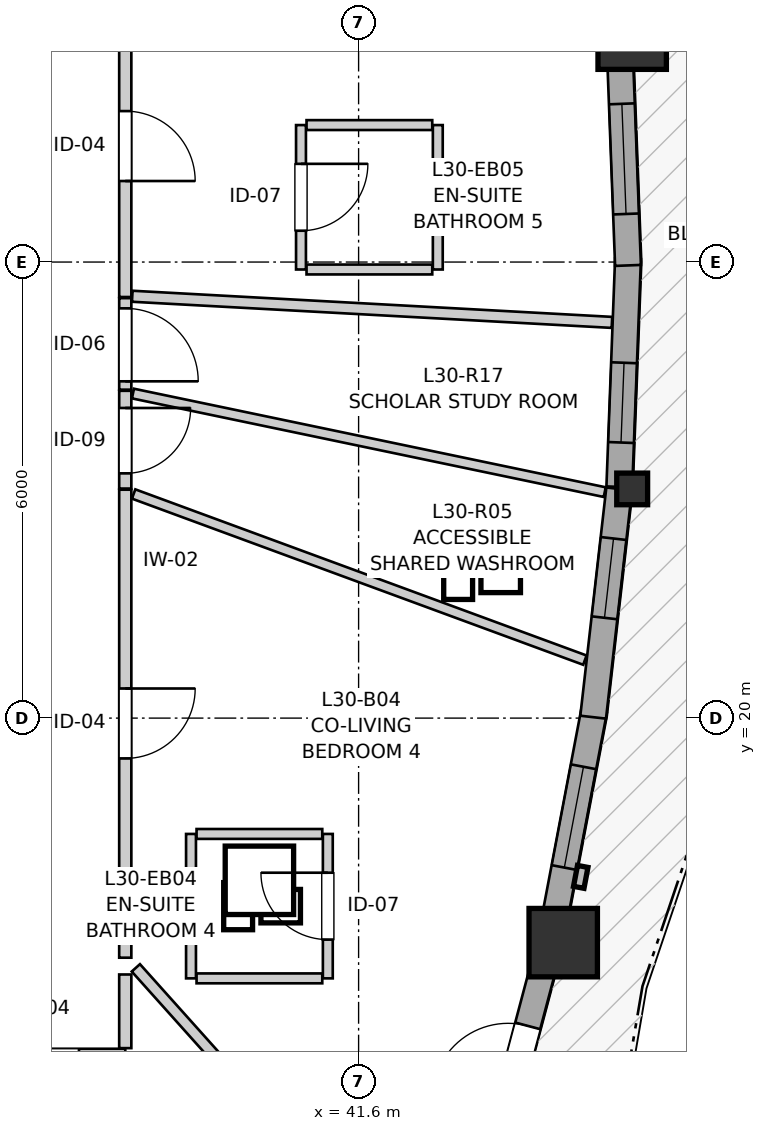
"""IFC4 building model, lengths in metres.
Left out: names, types, materials, properties, quantities, classifications, styles, units other than length and angle.
Written with IfcOpenShell. Run it as: python <this file> out.ifc"""

import sys

from ifc_helpers import new_model, si_unit, direction, frame, frame_2d, origin, origin_2d, place, context, subcontext, project, spatial, rectangle, i_section, extrude, source, transform, mapped, element, fill, save


model = new_model("IFC4")
c1 = context("Model", 3, precision=1e-05, world=origin(), true_north=direction((0.0, 1.0)))
c2 = subcontext(c1, "Body", "Model", "MODEL_VIEW")
j1 = project(units=[si_unit("LENGTHUNIT", "METRE"), si_unit("PLANEANGLEUNIT", "RADIAN")], contexts=[c1])
p1 = place(None, origin())
s1 = spatial("IfcSite", under=j1, at=p1, CompositionType="ELEMENT")
p2 = place(p1, origin())
s2 = spatial("IfcBuilding", under=s1, at=p2, CompositionType="ELEMENT")
p3 = place(p2, frame((0.0, 0.0, 102.4)))
s3 = spatial("IfcBuildingStorey", under=s2, at=p3, CompositionType="ELEMENT", Elevation=102.4)
m1 = source(origin(), c2, "Body", "SweptSolid", [
    extrude(rectangle(XDim=0.9, YDim=0.9, at=origin_2d()), origin(), (0.0, 0.0, 1.0), 2.95),
])
p4 = place(p3, frame((44.292, 17.046, 0.0), z_axis=(0.0, 0.0, 1.0), x_axis=(1.0, 0.0, 0.0)))
e1 = element("IfcColumn", 1, at=p4, inside=s3, PredefinedType="COLUMN", context=c2, shape_type="MappedRepresentation", body=[
    mapped(m1, transform((0.0, 0.0, 0.0), x_axis=(1.0, 0.0, 0.0), y_axis=(0.0, 1.0, 0.0), z_axis=(0.0, 0.0, 1.0), scale=1.0)),
])
m2 = source(origin(), c2, "Body", "SweptSolid", [
    extrude(i_section(OverallWidth=0.406, OverallDepth=0.416, WebThickness=0.027, FlangeThickness=0.044, FilletRadius=0.015, at=origin_2d()), origin(), (0.0, 0.0, 1.0), 2.95),
])
p5 = place(p3, frame((45.199, 23.015, 0.0), z_axis=(0.0, 0.0, 1.0), x_axis=(1.0, 0.0, 0.0)))
e2 = element("IfcColumn", 2, at=p5, inside=s3, PredefinedType="PILASTER", context=c2, shape_type="MappedRepresentation", body=[
    mapped(m2, transform((0.0, 0.0, 0.0), x_axis=(1.0, 0.0, 0.0), y_axis=(0.0, 1.0, 0.0), z_axis=(0.0, 0.0, 1.0), scale=1.0)),
])
p6 = place(p3, frame((45.199, 28.985, 0.0), z_axis=(0.0, 0.0, 1.0), x_axis=(1.0, 0.0, 0.0)))
e3 = element("IfcColumn", 3, at=p6, inside=s3, PredefinedType="COLUMN", context=c2, shape_type="MappedRepresentation", body=[
    mapped(m1, transform((0.0, 0.0, 0.0), x_axis=(1.0, 0.0, 0.0), y_axis=(0.0, 1.0, 0.0), z_axis=(0.0, 0.0, 1.0), scale=1.0)),
])
p7 = place(p3, frame((43.324, 14.068, 0.0), z_axis=(0.0, 0.0, 1.0), x_axis=(0.257085513118, 0.966388658328, 0.0)))
e4 = element("IfcWall", 4, at=p7, inside=s3, PredefinedType="SOLIDWALL", context=c2, shape_type="SweptSolid", body=[
    extrude(rectangle(XDim=2.896, YDim=0.34, at=frame_2d((1.448, 0.0))), origin(), (0.0, 0.0, 1.0), 2.48),
])
p8 = place(p7, frame((0.948, 0.0, 0.0)))
e5 = element("IfcOpeningElement", 5, at=p8, cuts=e4, PredefinedType="OPENING", context=c2, shape_type="SweptSolid", body=[
    extrude(rectangle(XDim=1.0, YDim=2.1, at=frame_2d((0.5, 1.05))), frame((0.0, 0.18, 0.0), z_axis=(0.0, -1.0, 0.0), x_axis=(1.0, 0.0, 0.0)), (0.0, 0.0, 1.0), 0.36),
])
p9 = place(p3, frame((44.168, 17.304, 0.0), z_axis=(0.0, 0.0, 1.0), x_axis=(0.186654850509, 0.982425552793, 0.0)))
e6 = element("IfcWall", 6, at=p9, inside=s3, PredefinedType="SOLIDWALL", context=c2, shape_type="SweptSolid", body=[
    extrude(rectangle(XDim=2.846, YDim=0.34, at=frame_2d((1.423, 0.0))), origin(), (0.0, 0.0, 1.0), 2.48),
])
p10 = place(p9, frame((0.743, 0.0, 0.82)))
e7 = element("IfcOpeningElement", 7, at=p10, cuts=e6, PredefinedType="OPENING", context=c2, shape_type="SweptSolid", body=[
    extrude(rectangle(XDim=1.35, YDim=1.45, at=frame_2d((0.675, 0.725))), frame((0.0, 0.18, 0.0), z_axis=(0.0, -1.0, 0.0), x_axis=(1.0, 0.0, 0.0)), (0.0, 0.0, 1.0), 0.36),
])
p11 = place(p3, frame((44.686, 20.012, 0.0), z_axis=(0.0, 0.0, 1.0), x_axis=(0.113268604106, 0.993564403209, 0.0)))
e8 = element("IfcWall", 8, at=p11, inside=s3, PredefinedType="SOLIDWALL", context=c2, shape_type="SweptSolid", body=[
    extrude(rectangle(XDim=3.022, YDim=0.34, at=frame_2d((1.511, 0.0))), origin(), (0.0, 0.0, 1.0), 2.48),
])
p12 = place(p11, frame((1.316, 0.0, 0.82)))
e9 = element("IfcOpeningElement", 9, at=p12, cuts=e8, PredefinedType="OPENING", context=c2, shape_type="SweptSolid", body=[
    extrude(rectangle(XDim=1.05, YDim=1.45, at=frame_2d((0.525, 0.725))), frame((0.0, 0.18, 0.0), z_axis=(0.0, -1.0, 0.0), x_axis=(1.0, 0.0, 0.0)), (0.0, 0.0, 1.0), 0.36),
])
p13 = place(p3, frame((45.031, 23.042, 0.0), z_axis=(0.0, 0.0, 1.0), x_axis=(0.037943223979, 0.999279896603, 0.0)))
e10 = element("IfcWall", 10, at=p13, inside=s3, PredefinedType="SOLIDWALL", context=c2, shape_type="SweptSolid", body=[
    extrude(rectangle(XDim=3.005, YDim=0.34, at=frame_2d((1.502, 0.0))), origin(), (0.0, 0.0, 1.0), 2.48),
])
p14 = place(p13, frame((0.584, 0.0, 0.82)))
e11 = element("IfcOpeningElement", 11, at=p14, cuts=e10, PredefinedType="OPENING", context=c2, shape_type="SweptSolid", body=[
    extrude(rectangle(XDim=1.05, YDim=1.45, at=frame_2d((0.525, 0.725))), frame((0.0, 0.18, 0.0), z_axis=(0.0, -1.0, 0.0), x_axis=(1.0, 0.0, 0.0)), (0.0, 0.0, 1.0), 0.36),
])
p15 = place(p3, frame((45.145, 25.956, 0.0), z_axis=(0.0, 0.0, 1.0), x_axis=(-0.038000333161, 0.9992777265, 0.0)))
e12 = element("IfcWall", 12, at=p15, inside=s3, PredefinedType="SOLIDWALL", context=c2, shape_type="SweptSolid", body=[
    extrude(rectangle(XDim=2.795, YDim=0.34, at=frame_2d((1.397, 0.0))), origin(), (0.0, 0.0, 1.0), 2.48),
])
p16 = place(p15, frame((0.677, 0.0, 0.82)))
e13 = element("IfcOpeningElement", 13, at=p16, cuts=e12, PredefinedType="OPENING", context=c2, shape_type="SweptSolid", body=[
    extrude(rectangle(XDim=1.45, YDim=1.25, at=frame_2d((0.725, 0.625))), frame((0.0, 0.18, 0.0), z_axis=(0.0, -1.0, 0.0), x_axis=(1.0, 0.0, 0.0)), (0.0, 0.0, 1.0), 0.36),
])
p17 = place(p3, frame((38.53, 23.005, 0.0), z_axis=(0.0, 0.0, 1.0), x_axis=(0.0, -1.0, 0.0)))
e14 = element("IfcWall", 14, at=p17, inside=s3, PredefinedType="PARTITIONING", context=c2, shape_type="SweptSolid", body=[
    extrude(rectangle(XDim=6.157, YDim=0.16, at=frame_2d((3.079, 0.0))), origin(), (0.0, 0.0, 1.0), 2.95),
])
p18 = place(p17, frame((2.615, 0.0, 0.0)))
e15 = element("IfcOpeningElement", 15, at=p18, cuts=e14, PredefinedType="OPENING", context=c2, shape_type="SweptSolid", body=[
    extrude(rectangle(XDim=0.92, YDim=2.1, at=frame_2d((0.46, 1.05))), frame((0.0, 0.09, 0.0), z_axis=(0.0, -1.0, 0.0), x_axis=(1.0, 0.0, 0.0)), (0.0, 0.0, 1.0), 0.18),
])
p19 = place(p3, frame((38.53, 29.514, 0.0), z_axis=(0.0, 0.0, 1.0), x_axis=(0.0, -1.0, 0.0)))
e16 = element("IfcWall", 16, at=p19, inside=s3, PredefinedType="PARTITIONING", context=c2, shape_type="SweptSolid", body=[
    extrude(rectangle(XDim=3.974, YDim=0.16, at=frame_2d((1.987, 0.0))), origin(), (0.0, 0.0, 1.0), 2.95),
])
p20 = place(p19, frame((1.528, 0.0, 0.0)))
e17 = element("IfcOpeningElement", 17, at=p20, cuts=e16, PredefinedType="OPENING", context=c2, shape_type="SweptSolid", body=[
    extrude(rectangle(XDim=0.92, YDim=2.1, at=frame_2d((0.46, 1.05))), frame((0.0, 0.09, 0.0), z_axis=(0.0, -1.0, 0.0), x_axis=(1.0, 0.0, 0.0)), (0.0, 0.0, 1.0), 0.18),
])
p21 = place(p3, frame((38.53, 15.57, 0.0), z_axis=(0.0, 0.0, 1.0), x_axis=(-1.0, 0.0, 0.0)))
e18 = element("IfcWall", 18, at=p21, inside=s3, PredefinedType="PARTITIONING", context=c2, shape_type="SweptSolid", body=[
    extrude(rectangle(XDim=2.156, YDim=0.16, at=frame_2d((1.078, 0.0))), origin(), (0.0, 0.0, 1.0), 2.95),
])
p22 = place(p21, frame((0.609, 0.0, 0.0)))
e19 = element("IfcOpeningElement", 19, at=p22, cuts=e18, PredefinedType="OPENING", context=c2, shape_type="SweptSolid", body=[
    extrude(rectangle(XDim=0.92, YDim=2.1, at=frame_2d((0.46, 1.05))), frame((0.0, 0.09, 0.0), z_axis=(0.0, -1.0, 0.0), x_axis=(1.0, 0.0, 0.0)), (0.0, 0.0, 1.0), 0.18),
])
p23 = place(p3, frame((41.195, 16.576, 0.0), z_axis=(0.0, 0.0, 1.0), x_axis=(0.0, 1.0, 0.0)))
e20 = element("IfcWall", 20, at=p23, inside=s3, PredefinedType="PARTITIONING", context=c2, shape_type="SweptSolid", body=[
    extrude(rectangle(XDim=1.9, YDim=0.13, at=frame_2d((0.95, 0.0))), origin(), (0.0, 0.0, 1.0), 2.95),
])
p24 = place(p23, frame((0.51, 0.0, 0.0)))
e21 = element("IfcOpeningElement", 21, at=p24, cuts=e20, PredefinedType="OPENING", context=c2, shape_type="SweptSolid", body=[
    extrude(rectangle(XDim=0.88, YDim=2.05, at=frame_2d((0.44, 1.025))), frame((0.0, 0.075, 0.0), z_axis=(0.0, -1.0, 0.0), x_axis=(1.0, 0.0, 0.0)), (0.0, 0.0, 1.0), 0.15),
])
p25 = place(p3, frame((40.842, 27.802, 0.0), z_axis=(0.0, 0.0, 1.0), x_axis=(0.0, -1.0, 0.0)))
e22 = element("IfcWall", 22, at=p25, inside=s3, PredefinedType="PARTITIONING", context=c2, shape_type="SweptSolid", body=[
    extrude(rectangle(XDim=1.9, YDim=0.13, at=frame_2d((0.95, 0.0))), origin(), (0.0, 0.0, 1.0), 2.95),
])
p26 = place(p25, frame((0.51, 0.0, 0.0)))
e23 = element("IfcOpeningElement", 23, at=p26, cuts=e22, PredefinedType="OPENING", context=c2, shape_type="SweptSolid", body=[
    extrude(rectangle(XDim=0.88, YDim=2.05, at=frame_2d((0.44, 1.025))), frame((0.0, 0.075, 0.0), z_axis=(0.0, -1.0, 0.0), x_axis=(1.0, 0.0, 0.0)), (0.0, 0.0, 1.0), 0.15),
])
p27 = place(p3, frame((38.53, 24.306, 0.0), z_axis=(0.0, 0.0, 1.0), x_axis=(0.0, -1.0, 0.0)))
e24 = element("IfcWall", 24, at=p27, inside=s3, PredefinedType="PARTITIONING", context=c2, shape_type="SweptSolid", body=[
    extrude(rectangle(XDim=1.286, YDim=0.16, at=frame_2d((0.643, 0.0))), origin(), (0.0, 0.0, 1.0), 2.95),
])
p28 = place(p27, frame((0.226, 0.0, 0.0)))
e25 = element("IfcOpeningElement", 25, at=p28, cuts=e24, PredefinedType="OPENING", context=c2, shape_type="SweptSolid", body=[
    extrude(rectangle(XDim=0.86, YDim=2.05, at=frame_2d((0.43, 1.025))), frame((0.0, 0.09, 0.0), z_axis=(0.0, -1.0, 0.0), x_axis=(1.0, 0.0, 0.0)), (0.0, 0.0, 1.0), 0.18),
])
p29 = place(p3, frame((38.53, 25.525, 0.0), z_axis=(0.0, 0.0, 1.0), x_axis=(0.0, -1.0, 0.0)))
e26 = element("IfcWall", 26, at=p29, inside=s3, PredefinedType="PARTITIONING", context=c2, shape_type="SweptSolid", body=[
    extrude(rectangle(XDim=1.204, YDim=0.16, at=frame_2d((0.602, 0.0))), origin(), (0.0, 0.0, 1.0), 2.95),
])
p30 = place(p29, frame((0.134, 0.0, 0.0)))
e27 = element("IfcOpeningElement", 27, at=p30, cuts=e26, PredefinedType="OPENING", context=c2, shape_type="SweptSolid", body=[
    extrude(rectangle(XDim=0.96, YDim=2.1, at=frame_2d((0.48, 1.05))), frame((0.0, 0.09, 0.0), z_axis=(0.0, -1.0, 0.0), x_axis=(1.0, 0.0, 0.0)), (0.0, 0.0, 1.0), 0.18),
])
p31 = place(p3, frame((38.64, 22.948, 0.0), z_axis=(0.0, 0.0, 1.0), x_axis=(0.938426101424, -0.3454800315, 0.0)))
e28 = element("IfcWall", 28, at=p31, inside=s3, PredefinedType="PARTITIONING", context=c2, shape_type="SweptSolid", body=[
    extrude(rectangle(XDim=6.327, YDim=0.13, at=frame_2d((3.164, 0.0))), origin(), (0.0, 0.0, 1.0), 2.95),
])
p32 = place(p3, frame((38.631, 24.27, 0.0), z_axis=(0.0, 0.0, 1.0), x_axis=(0.978856283814, -0.204549201019, 0.0)))
e29 = element("IfcWall", 29, at=p32, inside=s3, PredefinedType="PARTITIONING", context=c2, shape_type="SweptSolid", body=[
    extrude(rectangle(XDim=6.341, YDim=0.13, at=frame_2d((3.171, 0.0))), origin(), (0.0, 0.0, 1.0), 2.95),
])
p33 = place(p3, frame((38.622, 25.55, 0.0), z_axis=(0.0, 0.0, 1.0), x_axis=(0.998518036703, -0.054421782211, 0.0)))
e30 = element("IfcWall", 30, at=p33, inside=s3, PredefinedType="PARTITIONING", context=c2, shape_type="SweptSolid", body=[
    extrude(rectangle(XDim=6.321, YDim=0.145, at=frame_2d((3.16, 0.0))), origin(), (0.0, 0.0, 1.0), 2.95),
])
p34 = place(p3, frame((38.669, 16.715, 0.0), z_axis=(0.0, 0.0, 1.0), x_axis=(0.667262858083, -0.744822313188, 0.0)))
e31 = element("IfcWall", 31, at=p34, inside=s3, PredefinedType="PARTITIONING", context=c2, shape_type="SweptSolid", body=[
    extrude(rectangle(XDim=2.912, YDim=0.145, at=frame_2d((1.456, 0.0))), origin(), (0.0, 0.0, 1.0), 2.95),
])
p35 = place(p3, frame((39.395, 16.576, 0.0), z_axis=(0.0, 0.0, 1.0), x_axis=(0.0, 1.0, 0.0)))
e32 = element("IfcWall", 32, at=p35, inside=s3, PredefinedType="PARTITIONING", context=c2, shape_type="SweptSolid", body=[
    extrude(rectangle(XDim=1.9, YDim=0.13, at=frame_2d((0.95, 0.0))), origin(), (0.0, 0.0, 1.0), 2.95),
])
p36 = place(p3, frame((42.642, 25.902, 0.0), z_axis=(0.0, 0.0, 1.0), x_axis=(0.0, 1.0, 0.0)))
e33 = element("IfcWall", 33, at=p36, inside=s3, PredefinedType="PARTITIONING", context=c2, shape_type="SweptSolid", body=[
    extrude(rectangle(XDim=1.9, YDim=0.13, at=frame_2d((0.95, 0.0))), origin(), (0.0, 0.0, 1.0), 2.558),
])
for number, where, z_axis, x_axis in (
    (34, (40.915, 27.802, 0.0), (0.0, 0.0, 1.0), (1.0, 0.0, 0.0)),
    (35, (40.915, 25.902, 0.0), (0.0, 0.0, 1.0), (1.0, 0.0, 0.0)),
    (36, (39.468, 18.476, 0.0), (0.0, 0.0, 1.0), (1.0, 0.0, 0.0)),
    (37, (39.468, 16.576, 0.0), (0.0, 0.0, 1.0), (1.0, 0.0, 0.0)),
):
    element("IfcWall", number, at=place(p3, frame(where, z_axis=z_axis, x_axis=x_axis)), inside=s3, PredefinedType="PARTITIONING", context=c2, shape_type="SweptSolid", body=[
        extrude(rectangle(XDim=1.654, YDim=0.13, at=frame_2d((0.827, 0.0))), origin(), (0.0, 0.0, 1.0), 2.95),
    ])
p37 = place(p3, frame((38.53, 15.658, 0.0), z_axis=(0.0, 0.0, 1.0), x_axis=(0.0, 1.0, 0.0)))
e38 = element("IfcWall", 38, at=p37, inside=s3, PredefinedType="PARTITIONING", context=c2, shape_type="SweptSolid", body=[
    extrude(rectangle(XDim=0.969, YDim=0.16, at=frame_2d((0.484, 0.0))), origin(), (0.0, 0.0, 1.0), 2.95),
])
m3 = source(origin(), c2, "Body", "SweptSolid", [
    extrude(rectangle(XDim=1.35, YDim=1.45, at=frame_2d((0.675, 0.725))), frame((0.0, 0.03, 0.0), z_axis=(0.0, -1.0, 0.0), x_axis=(1.0, 0.0, 0.0)), (0.0, 0.0, 1.0), 0.06),
])
p38 = place(p10, origin())
e39 = element("IfcWindow", 39, at=p38, inside=s3, PartitioningType="SINGLE_PANEL", PredefinedType="WINDOW", context=c2, shape_type="MappedRepresentation", body=[
    mapped(m3, transform((0.0, 0.0, 0.0), x_axis=(1.0, 0.0, 0.0), y_axis=(0.0, 1.0, 0.0), z_axis=(0.0, 0.0, 1.0), scale=1.0)),
])
fill(e7, e39)
m4 = source(origin(), c2, "Body", "SweptSolid", [
    extrude(rectangle(XDim=1.05, YDim=1.45, at=frame_2d((0.525, 0.725))), frame((0.0, 0.03, 0.0), z_axis=(0.0, -1.0, 0.0), x_axis=(1.0, 0.0, 0.0)), (0.0, 0.0, 1.0), 0.06),
])
p39 = place(p12, origin())
e40 = element("IfcWindow", 40, at=p39, inside=s3, PartitioningType="SINGLE_PANEL", PredefinedType="WINDOW", context=c2, shape_type="MappedRepresentation", body=[
    mapped(m4, transform((0.0, 0.0, 0.0), x_axis=(1.0, 0.0, 0.0), y_axis=(0.0, 1.0, 0.0), z_axis=(0.0, 0.0, 1.0), scale=1.0)),
])
fill(e9, e40)
p40 = place(p14, origin())
e41 = element("IfcWindow", 41, at=p40, inside=s3, PartitioningType="SINGLE_PANEL", PredefinedType="WINDOW", context=c2, shape_type="MappedRepresentation", body=[
    mapped(m4, transform((0.0, 0.0, 0.0), x_axis=(1.0, 0.0, 0.0), y_axis=(0.0, 1.0, 0.0), z_axis=(0.0, 0.0, 1.0), scale=1.0)),
])
fill(e11, e41)
m5 = source(origin(), c2, "Body", "SweptSolid", [
    extrude(rectangle(XDim=1.45, YDim=1.25, at=frame_2d((0.725, 0.625))), frame((0.0, 0.03, 0.0), z_axis=(0.0, -1.0, 0.0), x_axis=(1.0, 0.0, 0.0)), (0.0, 0.0, 1.0), 0.06),
])
p41 = place(p16, origin())
e42 = element("IfcWindow", 42, at=p41, inside=s3, PartitioningType="SINGLE_PANEL", PredefinedType="WINDOW", context=c2, shape_type="MappedRepresentation", body=[
    mapped(m5, transform((0.0, 0.0, 0.0), x_axis=(1.0, 0.0, 0.0), y_axis=(0.0, 1.0, 0.0), z_axis=(0.0, 0.0, 1.0), scale=1.0)),
])
fill(e13, e42)
m6 = source(origin(), c2, "Body", "SweptSolid", [
    extrude(rectangle(XDim=1.0, YDim=2.1, at=frame_2d((0.5, 1.05))), frame((0.0, 0.025, 0.0), z_axis=(0.0, -1.0, 0.0), x_axis=(1.0, 0.0, 0.0)), (0.0, 0.0, 1.0), 0.05),
])
p42 = place(p8, origin())
e43 = element("IfcDoor", 43, at=p42, inside=s3, OperationType="SINGLE_SWING_LEFT", PredefinedType="DOOR", context=c2, shape_type="MappedRepresentation", body=[
    mapped(m6, transform((0.0, 0.0, 0.0), x_axis=(1.0, 0.0, 0.0), y_axis=(0.0, 1.0, 0.0), z_axis=(0.0, 0.0, 1.0), scale=1.0)),
])
fill(e5, e43)
m7 = source(origin(), c2, "Body", "SweptSolid", [
    extrude(rectangle(XDim=0.92, YDim=2.1, at=frame_2d((0.46, 1.05))), frame((0.0, 0.025, 0.0), z_axis=(0.0, -1.0, 0.0), x_axis=(1.0, 0.0, 0.0)), (0.0, 0.0, 1.0), 0.05),
])
p43 = place(p18, origin())
e44 = element("IfcDoor", 44, at=p43, inside=s3, OperationType="SINGLE_SWING_LEFT", PredefinedType="DOOR", context=c2, shape_type="MappedRepresentation", body=[
    mapped(m7, transform((0.0, 0.0, 0.0), x_axis=(1.0, 0.0, 0.0), y_axis=(0.0, 1.0, 0.0), z_axis=(0.0, 0.0, 1.0), scale=1.0)),
])
fill(e15, e44)
p44 = place(p20, origin())
e45 = element("IfcDoor", 45, at=p44, inside=s3, OperationType="SINGLE_SWING_RIGHT", PredefinedType="DOOR", context=c2, shape_type="MappedRepresentation", body=[
    mapped(m7, transform((0.0, 0.0, 0.0), x_axis=(1.0, 0.0, 0.0), y_axis=(0.0, 1.0, 0.0), z_axis=(0.0, 0.0, 1.0), scale=1.0)),
])
fill(e17, e45)
m8 = source(origin(), c2, "Body", "SweptSolid", [
    extrude(rectangle(XDim=0.88, YDim=2.05, at=frame_2d((0.44, 1.025))), frame((0.0, 0.025, 0.0), z_axis=(0.0, -1.0, 0.0), x_axis=(1.0, 0.0, 0.0)), (0.0, 0.0, 1.0), 0.05),
])
p45 = place(p24, origin())
e46 = element("IfcDoor", 46, at=p45, inside=s3, OperationType="SINGLE_SWING_RIGHT", PredefinedType="DOOR", context=c2, shape_type="MappedRepresentation", body=[
    mapped(m8, transform((0.0, 0.0, 0.0), x_axis=(1.0, 0.0, 0.0), y_axis=(0.0, 1.0, 0.0), z_axis=(0.0, 0.0, 1.0), scale=1.0)),
])
fill(e21, e46)
p46 = place(p26, origin())
e47 = element("IfcDoor", 47, at=p46, inside=s3, OperationType="SINGLE_SWING_LEFT", PredefinedType="DOOR", context=c2, shape_type="MappedRepresentation", body=[
    mapped(m8, transform((0.0, 0.0, 0.0), x_axis=(1.0, 0.0, 0.0), y_axis=(0.0, 1.0, 0.0), z_axis=(0.0, 0.0, 1.0), scale=1.0)),
])
fill(e23, e47)
m9 = source(origin(), c2, "Body", "SweptSolid", [
    extrude(rectangle(XDim=0.86, YDim=2.05, at=frame_2d((0.43, 1.025))), frame((0.0, 0.025, 0.0), z_axis=(0.0, -1.0, 0.0), x_axis=(1.0, 0.0, 0.0)), (0.0, 0.0, 1.0), 0.05),
])
p47 = place(p28, origin())
e48 = element("IfcDoor", 48, at=p47, inside=s3, OperationType="SINGLE_SWING_LEFT", PredefinedType="DOOR", context=c2, shape_type="MappedRepresentation", body=[
    mapped(m9, transform((0.0, 0.0, 0.0), x_axis=(1.0, 0.0, 0.0), y_axis=(0.0, 1.0, 0.0), z_axis=(0.0, 0.0, 1.0), scale=1.0)),
])
fill(e25, e48)
m10 = source(origin(), c2, "Body", "SweptSolid", [
    extrude(rectangle(XDim=0.96, YDim=2.1, at=frame_2d((0.48, 1.05))), frame((0.0, 0.025, 0.0), z_axis=(0.0, -1.0, 0.0), x_axis=(1.0, 0.0, 0.0)), (0.0, 0.0, 1.0), 0.05),
])
p48 = place(p30, origin())
e49 = element("IfcDoor", 49, at=p48, inside=s3, OperationType="SINGLE_SWING_RIGHT", PredefinedType="DOOR", context=c2, shape_type="MappedRepresentation", body=[
    mapped(m10, transform((0.0, 0.0, 0.0), x_axis=(1.0, 0.0, 0.0), y_axis=(0.0, 1.0, 0.0), z_axis=(0.0, 0.0, 1.0), scale=1.0)),
])
fill(e27, e49)
save(model, sys.argv[1])
